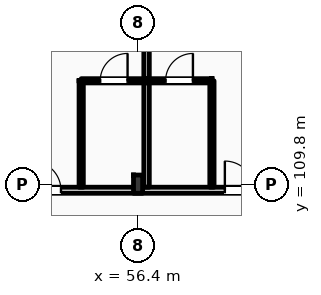
"""IFC4 building model, lengths in metres.
Left out: names, types, materials, properties, quantities, classifications, styles, units other than length and angle.
Written with IfcOpenShell. Run it as: python <this file> out.ifc"""

import sys

from ifc_helpers import new_model, si_unit, direction, frame, frame_2d, origin, origin_2d, place, context, subcontext, project, spatial, rectangle, i_section, extrude, element, fill, save


model = new_model("IFC4")
c1 = context("Model", 3, precision=1e-05, world=origin(), true_north=direction((0.0, 1.0)))
c2 = subcontext(c1, "Body", "Model", "MODEL_VIEW")
j1 = project(units=[si_unit("LENGTHUNIT", "METRE"), si_unit("PLANEANGLEUNIT", "RADIAN")], contexts=[c1])
p1 = place(None, origin())
s1 = spatial("IfcSite", under=j1, at=p1, CompositionType="ELEMENT")
p2 = place(p1, origin())
s2 = spatial("IfcBuilding", under=s1, at=p2, CompositionType="ELEMENT")
p3 = place(p2, frame((0.0, 0.0, 20.4)))
s3 = spatial("IfcBuildingStorey", under=s2, at=p3, CompositionType="ELEMENT", Elevation=20.4)
p4 = place(p3, frame((56.4, 109.8, 0.0), z_axis=(0.0, 0.0, 1.0), x_axis=(1.0, 0.0, 0.0)))
e1 = element("IfcColumn", 1, at=p4, inside=s3, PredefinedType="COLUMN", context=c2, shape_type="SweptSolid", body=[
    extrude(i_section(OverallWidth=0.3, OverallDepth=0.6, WebThickness=0.015, FlangeThickness=0.03, FilletRadius=0.027, at=origin_2d()), origin(), (0.0, 0.0, 1.0), 4.2),
])
p5 = place(p3, frame((10.65, 109.6, 0.0), z_axis=(0.0, 0.0, 1.0), x_axis=(1.0, 0.0, 0.0)))
e2 = element("IfcWall", 2, at=p5, inside=s3, PredefinedType="PARTITIONING", context=c2, shape_type="SweptSolid", body=[
    extrude(rectangle(XDim=109.21, YDim=0.2, at=frame_2d((54.605, 0.0))), origin(), (0.0, 0.0, 1.0), 3.38),
])
p6 = place(p5, frame((12.535, 0.0, 0.0)))
e3 = element("IfcOpeningElement", 3, at=p6, cuts=e2, PredefinedType="OPENING", context=c2, shape_type="SweptSolid", body=[
    extrude(rectangle(XDim=1.02, YDim=2.2, at=frame_2d((0.51, 1.1))), frame((0.0, 0.11, 0.0), z_axis=(0.0, -1.0, 0.0), x_axis=(1.0, 0.0, 0.0)), (0.0, 0.0, 1.0), 0.22),
])
p7 = place(p5, frame((19.175, 0.0, 0.0)))
e4 = element("IfcOpeningElement", 4, at=p7, cuts=e2, PredefinedType="OPENING", context=c2, shape_type="SweptSolid", body=[
    extrude(rectangle(XDim=1.02, YDim=2.2, at=frame_2d((0.51, 1.1))), frame((0.0, 0.11, 0.0), z_axis=(0.0, -1.0, 0.0), x_axis=(1.0, 0.0, 0.0)), (0.0, 0.0, 1.0), 0.22),
])
p8 = place(p5, frame((23.375, 0.0, 0.0)))
e5 = element("IfcOpeningElement", 5, at=p8, cuts=e2, PredefinedType="OPENING", context=c2, shape_type="SweptSolid", body=[
    extrude(rectangle(XDim=1.02, YDim=2.2, at=frame_2d((0.51, 1.1))), frame((0.0, 0.11, 0.0), z_axis=(0.0, -1.0, 0.0), x_axis=(1.0, 0.0, 0.0)), (0.0, 0.0, 1.0), 0.22),
])
p9 = place(p5, frame((27.575, 0.0, 0.0)))
e6 = element("IfcOpeningElement", 6, at=p9, cuts=e2, PredefinedType="OPENING", context=c2, shape_type="SweptSolid", body=[
    extrude(rectangle(XDim=1.02, YDim=2.2, at=frame_2d((0.51, 1.1))), frame((0.0, 0.11, 0.0), z_axis=(0.0, -1.0, 0.0), x_axis=(1.0, 0.0, 0.0)), (0.0, 0.0, 1.0), 0.22),
])
p10 = place(p5, frame((31.805, 0.0, 0.0)))
e7 = element("IfcOpeningElement", 7, at=p10, cuts=e2, PredefinedType="OPENING", context=c2, shape_type="SweptSolid", body=[
    extrude(rectangle(XDim=0.96, YDim=2.2, at=frame_2d((0.48, 1.1))), frame((0.0, 0.11, 0.0), z_axis=(0.0, -1.0, 0.0), x_axis=(1.0, 0.0, 0.0)), (0.0, 0.0, 1.0), 0.22),
])
p11 = place(p5, frame((33.855, 0.0, 0.0)))
e8 = element("IfcOpeningElement", 8, at=p11, cuts=e2, PredefinedType="OPENING", context=c2, shape_type="SweptSolid", body=[
    extrude(rectangle(XDim=0.96, YDim=2.2, at=frame_2d((0.48, 1.1))), frame((0.0, 0.11, 0.0), z_axis=(0.0, -1.0, 0.0), x_axis=(1.0, 0.0, 0.0)), (0.0, 0.0, 1.0), 0.22),
])
p12 = place(p5, frame((40.205, 0.0, 0.0)))
e9 = element("IfcOpeningElement", 9, at=p12, cuts=e2, PredefinedType="OPENING", context=c2, shape_type="SweptSolid", body=[
    extrude(rectangle(XDim=0.96, YDim=2.2, at=frame_2d((0.48, 1.1))), frame((0.0, 0.11, 0.0), z_axis=(0.0, -1.0, 0.0), x_axis=(1.0, 0.0, 0.0)), (0.0, 0.0, 1.0), 0.22),
])
p13 = place(p5, frame((42.255, 0.0, 0.0)))
e10 = element("IfcOpeningElement", 10, at=p13, cuts=e2, PredefinedType="OPENING", context=c2, shape_type="SweptSolid", body=[
    extrude(rectangle(XDim=0.96, YDim=2.2, at=frame_2d((0.48, 1.1))), frame((0.0, 0.11, 0.0), z_axis=(0.0, -1.0, 0.0), x_axis=(1.0, 0.0, 0.0)), (0.0, 0.0, 1.0), 0.22),
])
p14 = place(p5, frame((48.605, 0.0, 0.0)))
e11 = element("IfcOpeningElement", 11, at=p14, cuts=e2, PredefinedType="OPENING", context=c2, shape_type="SweptSolid", body=[
    extrude(rectangle(XDim=0.96, YDim=2.2, at=frame_2d((0.48, 1.1))), frame((0.0, 0.11, 0.0), z_axis=(0.0, -1.0, 0.0), x_axis=(1.0, 0.0, 0.0)), (0.0, 0.0, 1.0), 0.22),
])
p15 = place(p5, frame((50.655, 0.0, 0.0)))
e12 = element("IfcOpeningElement", 12, at=p15, cuts=e2, PredefinedType="OPENING", context=c2, shape_type="SweptSolid", body=[
    extrude(rectangle(XDim=0.96, YDim=2.2, at=frame_2d((0.48, 1.1))), frame((0.0, 0.11, 0.0), z_axis=(0.0, -1.0, 0.0), x_axis=(1.0, 0.0, 0.0)), (0.0, 0.0, 1.0), 0.22),
])
p16 = place(p5, frame((57.005, 0.0, 0.0)))
e13 = element("IfcOpeningElement", 13, at=p16, cuts=e2, PredefinedType="OPENING", context=c2, shape_type="SweptSolid", body=[
    extrude(rectangle(XDim=0.96, YDim=2.2, at=frame_2d((0.48, 1.1))), frame((0.0, 0.11, 0.0), z_axis=(0.0, -1.0, 0.0), x_axis=(1.0, 0.0, 0.0)), (0.0, 0.0, 1.0), 0.22),
])
p17 = place(p5, frame((59.055, 0.0, 0.0)))
e14 = element("IfcOpeningElement", 14, at=p17, cuts=e2, PredefinedType="OPENING", context=c2, shape_type="SweptSolid", body=[
    extrude(rectangle(XDim=0.96, YDim=2.2, at=frame_2d((0.48, 1.1))), frame((0.0, 0.11, 0.0), z_axis=(0.0, -1.0, 0.0), x_axis=(1.0, 0.0, 0.0)), (0.0, 0.0, 1.0), 0.22),
])
p18 = place(p5, frame((65.405, 0.0, 0.0)))
e15 = element("IfcOpeningElement", 15, at=p18, cuts=e2, PredefinedType="OPENING", context=c2, shape_type="SweptSolid", body=[
    extrude(rectangle(XDim=0.96, YDim=2.2, at=frame_2d((0.48, 1.1))), frame((0.0, 0.11, 0.0), z_axis=(0.0, -1.0, 0.0), x_axis=(1.0, 0.0, 0.0)), (0.0, 0.0, 1.0), 0.22),
])
p19 = place(p5, frame((67.205, 0.0, 0.0)))
e16 = element("IfcOpeningElement", 16, at=p19, cuts=e2, PredefinedType="OPENING", context=c2, shape_type="SweptSolid", body=[
    extrude(rectangle(XDim=0.96, YDim=2.2, at=frame_2d((0.48, 1.1))), frame((0.0, 0.11, 0.0), z_axis=(0.0, -1.0, 0.0), x_axis=(1.0, 0.0, 0.0)), (0.0, 0.0, 1.0), 0.22),
])
p20 = place(p5, frame((73.805, 0.0, 0.0)))
e17 = element("IfcOpeningElement", 17, at=p20, cuts=e2, PredefinedType="OPENING", context=c2, shape_type="SweptSolid", body=[
    extrude(rectangle(XDim=0.96, YDim=2.2, at=frame_2d((0.48, 1.1))), frame((0.0, 0.11, 0.0), z_axis=(0.0, -1.0, 0.0), x_axis=(1.0, 0.0, 0.0)), (0.0, 0.0, 1.0), 0.22),
])
p21 = place(p5, frame((78.255, 0.0, 0.0)))
e18 = element("IfcOpeningElement", 18, at=p21, cuts=e2, PredefinedType="OPENING", context=c2, shape_type="SweptSolid", body=[
    extrude(rectangle(XDim=0.96, YDim=2.2, at=frame_2d((0.48, 1.1))), frame((0.0, 0.11, 0.0), z_axis=(0.0, -1.0, 0.0), x_axis=(1.0, 0.0, 0.0)), (0.0, 0.0, 1.0), 0.22),
])
p22 = place(p5, frame((82.205, 0.0, 0.0)))
e19 = element("IfcOpeningElement", 19, at=p22, cuts=e2, PredefinedType="OPENING", context=c2, shape_type="SweptSolid", body=[
    extrude(rectangle(XDim=0.96, YDim=2.2, at=frame_2d((0.48, 1.1))), frame((0.0, 0.11, 0.0), z_axis=(0.0, -1.0, 0.0), x_axis=(1.0, 0.0, 0.0)), (0.0, 0.0, 1.0), 0.22),
])
p23 = place(p5, frame((86.405, 0.0, 0.0)))
e20 = element("IfcOpeningElement", 20, at=p23, cuts=e2, PredefinedType="OPENING", context=c2, shape_type="SweptSolid", body=[
    extrude(rectangle(XDim=0.96, YDim=2.2, at=frame_2d((0.48, 1.1))), frame((0.0, 0.11, 0.0), z_axis=(0.0, -1.0, 0.0), x_axis=(1.0, 0.0, 0.0)), (0.0, 0.0, 1.0), 0.22),
])
p24 = place(p5, frame((90.605, 0.0, 0.0)))
e21 = element("IfcOpeningElement", 21, at=p24, cuts=e2, PredefinedType="OPENING", context=c2, shape_type="SweptSolid", body=[
    extrude(rectangle(XDim=0.96, YDim=2.2, at=frame_2d((0.48, 1.1))), frame((0.0, 0.11, 0.0), z_axis=(0.0, -1.0, 0.0), x_axis=(1.0, 0.0, 0.0)), (0.0, 0.0, 1.0), 0.22),
])
p25 = place(p5, frame((94.805, 0.0, 0.0)))
e22 = element("IfcOpeningElement", 22, at=p25, cuts=e2, PredefinedType="OPENING", context=c2, shape_type="SweptSolid", body=[
    extrude(rectangle(XDim=0.96, YDim=2.2, at=frame_2d((0.48, 1.1))), frame((0.0, 0.11, 0.0), z_axis=(0.0, -1.0, 0.0), x_axis=(1.0, 0.0, 0.0)), (0.0, 0.0, 1.0), 0.22),
])
p26 = place(p5, frame((99.005, 0.0, 0.0)))
e23 = element("IfcOpeningElement", 23, at=p26, cuts=e2, PredefinedType="OPENING", context=c2, shape_type="SweptSolid", body=[
    extrude(rectangle(XDim=0.96, YDim=2.2, at=frame_2d((0.48, 1.1))), frame((0.0, 0.11, 0.0), z_axis=(0.0, -1.0, 0.0), x_axis=(1.0, 0.0, 0.0)), (0.0, 0.0, 1.0), 0.22),
])
p27 = place(p5, frame((103.205, 0.0, 0.0)))
e24 = element("IfcOpeningElement", 24, at=p27, cuts=e2, PredefinedType="OPENING", context=c2, shape_type="SweptSolid", body=[
    extrude(rectangle(XDim=0.96, YDim=2.2, at=frame_2d((0.48, 1.1))), frame((0.0, 0.11, 0.0), z_axis=(0.0, -1.0, 0.0), x_axis=(1.0, 0.0, 0.0)), (0.0, 0.0, 1.0), 0.22),
])
p28 = place(p5, frame((105.335, 0.0, 0.0)))
e25 = element("IfcOpeningElement", 25, at=p28, cuts=e2, PredefinedType="OPENING", context=c2, shape_type="SweptSolid", body=[
    extrude(rectangle(XDim=0.96, YDim=2.2, at=frame_2d((0.48, 1.1))), frame((0.0, 0.11, 0.0), z_axis=(0.0, -1.0, 0.0), x_axis=(1.0, 0.0, 0.0)), (0.0, 0.0, 1.0), 0.22),
])
p29 = place(p5, frame((2.716, 0.0, 0.0)))
e26 = element("IfcOpeningElement", 26, at=p29, cuts=e2, PredefinedType="OPENING", context=c2, shape_type="SweptSolid", body=[
    extrude(rectangle(XDim=1.35, YDim=2.25, at=frame_2d((0.675, 1.125))), frame((0.0, 0.11, 0.0), z_axis=(0.0, -1.0, 0.0), x_axis=(1.0, 0.0, 0.0)), (0.0, 0.0, 1.0), 0.22),
])
p30 = place(p5, frame((6.65, 0.0, 0.0)))
e27 = element("IfcOpeningElement", 27, at=p30, cuts=e2, PredefinedType="OPENING", context=c2, shape_type="SweptSolid", body=[
    extrude(rectangle(XDim=1.35, YDim=2.25, at=frame_2d((0.675, 1.125))), frame((0.0, 0.11, 0.0), z_axis=(0.0, -1.0, 0.0), x_axis=(1.0, 0.0, 0.0)), (0.0, 0.0, 1.0), 0.22),
])
p31 = place(p5, frame((10.583, 0.0, 0.0)))
e28 = element("IfcOpeningElement", 28, at=p31, cuts=e2, PredefinedType="OPENING", context=c2, shape_type="SweptSolid", body=[
    extrude(rectangle(XDim=1.35, YDim=2.25, at=frame_2d((0.675, 1.125))), frame((0.0, 0.11, 0.0), z_axis=(0.0, -1.0, 0.0), x_axis=(1.0, 0.0, 0.0)), (0.0, 0.0, 1.0), 0.22),
])
p32 = place(p3, frame((56.68, 109.7, 0.0), z_axis=(0.0, 0.0, 1.0), x_axis=(0.0, 1.0, 0.0)))
e29 = element("IfcWall", 29, at=p32, inside=s3, PredefinedType="PARTITIONING", context=c2, shape_type="SweptSolid", body=[
    extrude(rectangle(XDim=8.15, YDim=0.18, at=frame_2d((4.075, 0.0))), origin(), (0.0, 0.0, 1.0), 3.94),
])
p33 = place(p3, frame((54.53, 109.7, 0.0), z_axis=(0.0, 0.0, 1.0), x_axis=(0.0, 1.0, 0.0)))
e30 = element("IfcWall", 30, at=p33, inside=s3, PredefinedType="PARTITIONING", context=c2, shape_type="SweptSolid", body=[
    extrude(rectangle(XDim=3.5, YDim=0.14, at=frame_2d((1.75, 0.0))), origin(), (0.0, 0.0, 1.0), 3.94),
])
p34 = place(p3, frame((54.53, 113.2, 0.0), z_axis=(0.0, 0.0, 1.0), x_axis=(1.0, 0.0, 0.0)))
e31 = element("IfcWall", 31, at=p34, inside=s3, PredefinedType="PARTITIONING", context=c2, shape_type="SweptSolid", body=[
    extrude(rectangle(XDim=2.15, YDim=0.14, at=frame_2d((1.075, 0.0))), origin(), (0.0, 0.0, 1.0), 3.94),
])
p35 = place(p34, frame((0.625, 0.0, 0.0)))
e32 = element("IfcOpeningElement", 32, at=p35, cuts=e31, PredefinedType="OPENING", context=c2, shape_type="SweptSolid", body=[
    extrude(rectangle(XDim=0.9, YDim=2.1, at=frame_2d((0.45, 1.05))), frame((0.0, 0.08, 0.0), z_axis=(0.0, -1.0, 0.0), x_axis=(1.0, 0.0, 0.0)), (0.0, 0.0, 1.0), 0.16),
])
p36 = place(p3, frame((58.83, 109.7, 0.0), z_axis=(0.0, 0.0, 1.0), x_axis=(0.0, 1.0, 0.0)))
e33 = element("IfcWall", 33, at=p36, inside=s3, PredefinedType="PARTITIONING", context=c2, shape_type="SweptSolid", body=[
    extrude(rectangle(XDim=3.5, YDim=0.14, at=frame_2d((1.75, 0.0))), origin(), (0.0, 0.0, 1.0), 3.63),
])
p37 = place(p3, frame((56.68, 113.2, 0.0), z_axis=(0.0, 0.0, 1.0), x_axis=(1.0, 0.0, 0.0)))
e34 = element("IfcWall", 34, at=p37, inside=s3, PredefinedType="PARTITIONING", context=c2, shape_type="SweptSolid", body=[
    extrude(rectangle(XDim=2.15, YDim=0.14, at=frame_2d((1.075, 0.0))), origin(), (0.0, 0.0, 1.0), 3.94),
])
p38 = place(p37, frame((0.625, 0.0, 0.0)))
e35 = element("IfcOpeningElement", 35, at=p38, cuts=e34, PredefinedType="OPENING", context=c2, shape_type="SweptSolid", body=[
    extrude(rectangle(XDim=0.9, YDim=2.1, at=frame_2d((0.45, 1.05))), frame((0.0, 0.08, 0.0), z_axis=(0.0, -1.0, 0.0), x_axis=(1.0, 0.0, 0.0)), (0.0, 0.0, 1.0), 0.16),
])
p39 = place(p13, origin())
e36 = element("IfcDoor", 36, at=p39, inside=s3, OperationType="SINGLE_SWING_LEFT", PredefinedType="DOOR", context=c2, shape_type="SweptSolid", body=[
    extrude(rectangle(XDim=0.96, YDim=2.2, at=frame_2d((0.48, 1.1))), frame((0.0, 0.025, 0.0), z_axis=(0.0, -1.0, 0.0), x_axis=(1.0, 0.0, 0.0)), (0.0, 0.0, 1.0), 0.05),
])
fill(e10, e36)
p40 = place(p35, origin())
e37 = element("IfcDoor", 37, at=p40, inside=s3, OperationType="SINGLE_SWING_RIGHT", PredefinedType="DOOR", context=c2, shape_type="SweptSolid", body=[
    extrude(rectangle(XDim=0.9, YDim=2.1, at=frame_2d((0.45, 1.05))), frame((0.0, 0.025, 0.0), z_axis=(0.0, -1.0, 0.0), x_axis=(1.0, 0.0, 0.0)), (0.0, 0.0, 1.0), 0.05),
])
fill(e32, e37)
p41 = place(p14, origin())
e38 = element("IfcDoor", 38, at=p41, inside=s3, OperationType="SINGLE_SWING_LEFT", PredefinedType="DOOR", context=c2, shape_type="SweptSolid", body=[
    extrude(rectangle(XDim=0.96, YDim=2.2, at=frame_2d((0.48, 1.1))), frame((0.0, 0.025, 0.0), z_axis=(0.0, -1.0, 0.0), x_axis=(1.0, 0.0, 0.0)), (0.0, 0.0, 1.0), 0.05),
])
fill(e11, e38)
p42 = place(p38, origin())
e39 = element("IfcDoor", 39, at=p42, inside=s3, OperationType="SINGLE_SWING_RIGHT", PredefinedType="DOOR", context=c2, shape_type="SweptSolid", body=[
    extrude(rectangle(XDim=0.9, YDim=2.1, at=frame_2d((0.45, 1.05))), frame((0.0, 0.025, 0.0), z_axis=(0.0, -1.0, 0.0), x_axis=(1.0, 0.0, 0.0)), (0.0, 0.0, 1.0), 0.05),
])
fill(e35, e39)
save(model, sys.argv[1])
